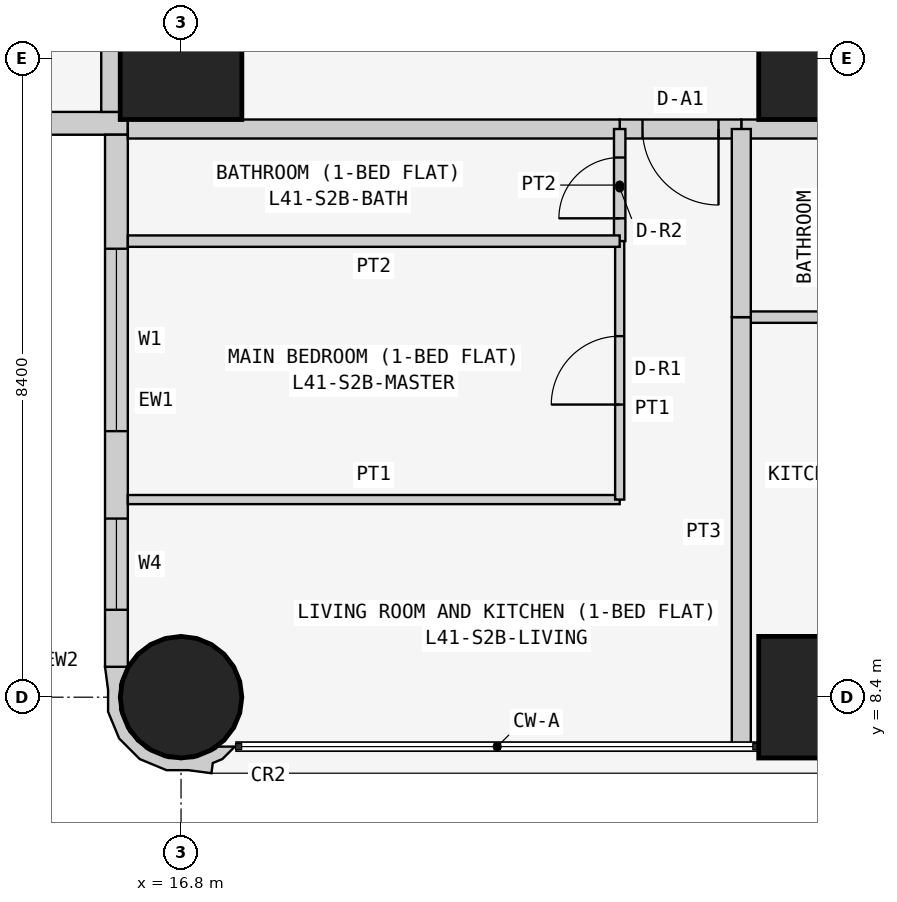
"""IFC4 building model, lengths in metres.
Left out: names, types, materials, properties, quantities, classifications, styles, units other than length and angle.
Written with IfcOpenShell. Run it as: python <this file> out.ifc"""

import sys

from ifc_helpers import new_model, si_unit, direction, frame, frame_2d, origin, origin_2d, place, context, subcontext, project, spatial, polyline, rectangle, circle, outline, extrude, element, fill, save


model = new_model("IFC4")
c1 = context("Model", 3, precision=1e-05, world=origin(), true_north=direction((0.0, 1.0)))
c2 = subcontext(c1, "Body", "Model", "MODEL_VIEW")
j1 = project(units=[si_unit("LENGTHUNIT", "METRE"), si_unit("PLANEANGLEUNIT", "RADIAN")], contexts=[c1])
p1 = place(None, origin())
s1 = spatial("IfcSite", under=j1, at=p1, CompositionType="ELEMENT")
p2 = place(p1, origin())
s2 = spatial("IfcBuilding", under=s1, at=p2, CompositionType="ELEMENT")
p3 = place(p2, frame((0.0, 0.0, 159.3)))
s3 = spatial("IfcBuildingStorey", under=s2, at=p3, CompositionType="ELEMENT", Elevation=159.3)
p4 = place(p3, frame((16.8, 8.4, 0.0), z_axis=(0.0, 0.0, 1.0), x_axis=(1.0, 0.0, 0.0)))
e1 = element("IfcColumn", 1, at=p4, inside=s3, PredefinedType="COLUMN", context=c2, shape_type="SweptSolid", body=[
    extrude(circle(Radius=0.8, at=origin_2d()), origin(), (0.0, 0.0, 1.0), 3.6),
])
for number, where, z_axis, x_axis in (
    (2, (16.8, 16.8, 0.0), (0.0, 0.0, 1.0), (1.0, 0.0, 0.0)),
    (3, (25.2, 8.4, 0.0), (0.0, 0.0, 1.0), (1.0, 0.0, 0.0)),
    (4, (25.2, 16.8, 0.0), (0.0, 0.0, 1.0), (1.0, 0.0, 0.0)),
):
    element("IfcColumn", number, at=place(p3, frame(where, z_axis=z_axis, x_axis=x_axis)), inside=s3, PredefinedType="COLUMN", context=c2, shape_type="SweptSolid", body=[
        extrude(rectangle(XDim=1.6, YDim=1.6, at=origin_2d()), origin(), (0.0, 0.0, 1.0), 3.6),
    ])
p5 = place(p3, frame((0.4, 15.95, 0.0), z_axis=(0.0, 0.0, 1.0), x_axis=(1.0, 0.0, 0.0)))
e5 = element("IfcWall", 5, at=p5, inside=s3, PredefinedType="SOLIDWALL", context=c2, shape_type="SweptSolid", body=[
    extrude(rectangle(XDim=15.7, YDim=0.3, at=frame_2d((7.85, 0.0))), origin(), (0.0, 0.0, 1.0), 3.45),
])
p6 = place(p5, frame((12.4, 0.0, 0.9)))
e6 = element("IfcOpeningElement", 6, at=p6, cuts=e5, PredefinedType="OPENING", context=c2, shape_type="SweptSolid", body=[
    extrude(rectangle(XDim=1.8, YDim=1.5, at=frame_2d((0.9, 0.75))), frame((0.0, 0.16, 0.0), z_axis=(0.0, -1.0, 0.0), x_axis=(1.0, 0.0, 0.0)), (0.0, 0.0, 1.0), 0.32),
])
p7 = place(p5, frame((9.55, 0.0, 1.5)))
e7 = element("IfcOpeningElement", 7, at=p7, cuts=e5, PredefinedType="OPENING", context=c2, shape_type="SweptSolid", body=[
    extrude(rectangle(XDim=0.9, YDim=0.7, at=frame_2d((0.45, 0.35))), frame((0.0, 0.16, 0.0), z_axis=(0.0, -1.0, 0.0), x_axis=(1.0, 0.0, 0.0)), (0.0, 0.0, 1.0), 0.32),
])
p8 = place(p5, frame((5.1, 0.0, 0.9)))
e8 = element("IfcOpeningElement", 8, at=p8, cuts=e5, PredefinedType="OPENING", context=c2, shape_type="SweptSolid", body=[
    extrude(rectangle(XDim=1.8, YDim=1.5, at=frame_2d((0.9, 0.75))), frame((0.0, 0.16, 0.0), z_axis=(0.0, -1.0, 0.0), x_axis=(1.0, 0.0, 0.0)), (0.0, 0.0, 1.0), 0.32),
])
p9 = place(p5, frame((2.0, 0.0, 0.0)))
e9 = element("IfcOpeningElement", 9, at=p9, cuts=e5, PredefinedType="OPENING", context=c2, shape_type="SweptSolid", body=[
    extrude(rectangle(XDim=0.9, YDim=2.4, at=frame_2d((0.45, 1.2))), frame((0.0, 0.16, 0.0), z_axis=(0.0, -1.0, 0.0), x_axis=(1.0, 0.0, 0.0)), (0.0, 0.0, 1.0), 0.32),
])
p10 = place(p5, frame((0.7, 0.0, 0.9)))
e10 = element("IfcOpeningElement", 10, at=p10, cuts=e5, PredefinedType="OPENING", context=c2, shape_type="SweptSolid", body=[
    extrude(rectangle(XDim=1.2, YDim=1.5, at=frame_2d((0.6, 0.75))), frame((0.0, 0.16, 0.0), z_axis=(0.0, -1.0, 0.0), x_axis=(1.0, 0.0, 0.0)), (0.0, 0.0, 1.0), 0.32),
])
p11 = place(p3, frame((15.95, 15.8, 0.0), z_axis=(0.0, 0.0, 1.0), x_axis=(0.0, -1.0, 0.0)))
e11 = element("IfcWall", 11, at=p11, inside=s3, PredefinedType="SOLIDWALL", context=c2, shape_type="SweptSolid", body=[
    extrude(rectangle(XDim=7.0, YDim=0.3, at=frame_2d((3.5, 0.0))), origin(), (0.0, 0.0, 1.0), 3.45),
])
p12 = place(p11, frame((1.5, 0.0, 0.9)))
e12 = element("IfcOpeningElement", 12, at=p12, cuts=e11, PredefinedType="OPENING", context=c2, shape_type="SweptSolid", body=[
    extrude(rectangle(XDim=2.4, YDim=1.5, at=frame_2d((1.2, 0.75))), frame((0.0, 0.16, 0.0), z_axis=(0.0, -1.0, 0.0), x_axis=(1.0, 0.0, 0.0)), (0.0, 0.0, 1.0), 0.32),
])
p13 = place(p11, frame((5.05, 0.0, 0.9)))
e13 = element("IfcOpeningElement", 13, at=p13, cuts=e11, PredefinedType="OPENING", context=c2, shape_type="SweptSolid", body=[
    extrude(rectangle(XDim=1.2, YDim=1.5, at=frame_2d((0.6, 0.75))), frame((0.0, 0.16, 0.0), z_axis=(0.0, -1.0, 0.0), x_axis=(1.0, 0.0, 0.0)), (0.0, 0.0, 1.0), 0.32),
])
p14 = place(p3, frame((15.983, 8.727, 0.0), z_axis=(0.0, 0.0, 1.0), x_axis=(-0.343276641956, -0.93923434088, 0.0)))
e14 = element("IfcWall", 14, at=p14, inside=s3, PredefinedType="SOLIDWALL", context=c2, shape_type="SweptSolid", body=[
    extrude(outline(polyline([(0.829, 1.599), (0.697, 1.569), (0.604, 1.67), (0.394, 1.767), (0.471, 1.556), (0.509, 1.539), (0.724, 1.304), (0.833, 1.005), (0.82, 0.686), (0.686, 0.397), (0.451, 0.182), (0.152, 0.073), (-0.116, 0.084), (-0.127, 0.078), (-0.146, 0.071), (-0.006, -0.197), (0.266, -0.055), (0.535, 0.044), (0.817, 0.302), (0.978, 0.648), (0.994, 1.03), (0.895, 1.3), (0.829, 1.599)])), origin(), (0.0, 0.0, 1.0), 3.45),
])
p15 = place(p3, frame((26.8, 15.875, 0.0), z_axis=(0.0, 0.0, 1.0), x_axis=(-1.0, 0.0, 0.0)))
e15 = element("IfcWall", 15, at=p15, inside=s3, PredefinedType="PARTITIONING", context=c2, shape_type="SweptSolid", body=[
    extrude(rectangle(XDim=2.629, YDim=0.25, at=frame_2d((1.314, 0.0))), origin(), (0.0, 0.0, 1.0), 3.45),
])
p16 = place(p3, frame((24.171, 15.875, 0.0), z_axis=(0.0, 0.0, 1.0), x_axis=(-1.0, 0.0, 0.0)))
e16 = element("IfcWall", 16, at=p16, inside=s3, PredefinedType="PARTITIONING", context=c2, shape_type="SweptSolid", body=[
    extrude(rectangle(XDim=1.6, YDim=0.25, at=frame_2d((0.8, 0.0))), origin(), (0.0, 0.0, 1.0), 3.45),
])
p17 = place(p16, frame((0.3, 0.0, 0.0)))
e17 = element("IfcOpeningElement", 17, at=p17, cuts=e16, PredefinedType="OPENING", context=c2, shape_type="SweptSolid", body=[
    extrude(rectangle(XDim=1.0, YDim=2.1, at=frame_2d((0.5, 1.05))), frame((0.0, 0.135, 0.0), z_axis=(0.0, -1.0, 0.0), x_axis=(1.0, 0.0, 0.0)), (0.0, 0.0, 1.0), 0.27),
])
p18 = place(p3, frame((22.571, 15.875, 0.0), z_axis=(0.0, 0.0, 1.0), x_axis=(-1.0, 0.0, 0.0)))
e18 = element("IfcWall", 18, at=p18, inside=s3, PredefinedType="PARTITIONING", context=c2, shape_type="SweptSolid", body=[
    extrude(rectangle(XDim=6.471, YDim=0.25, at=frame_2d((3.235, 0.0))), origin(), (0.0, 0.0, 1.0), 3.45),
])
p19 = place(p3, frame((15.875, 16.1, 0.0), z_axis=(0.0, 0.0, 1.0), x_axis=(0.0, 1.0, 0.0)))
e19 = element("IfcWall", 19, at=p19, inside=s3, PredefinedType="PARTITIONING", context=c2, shape_type="SweptSolid", body=[
    extrude(rectangle(XDim=6.871, YDim=0.25, at=frame_2d((3.436, 0.0))), origin(), (0.0, 0.0, 1.0), 3.45),
])
p20 = place(p3, frame((24.171, 13.4, 0.0), z_axis=(0.0, 0.0, 1.0), x_axis=(1.0, 0.0, 0.0)))
e20 = element("IfcWall", 20, at=p20, inside=s3, PredefinedType="PARTITIONING", context=c2, shape_type="SweptSolid", body=[
    extrude(rectangle(XDim=2.629, YDim=0.15, at=frame_2d((1.314, 0.0))), origin(), (0.0, 0.0, 1.0), 3.45),
])
p21 = place(p3, frame((24.171, 7.75, 0.0), z_axis=(0.0, 0.0, 1.0), x_axis=(0.0, 1.0, 0.0)))
e21 = element("IfcWall", 21, at=p21, inside=s3, PredefinedType="PARTITIONING", context=c2, shape_type="SweptSolid", body=[
    extrude(rectangle(XDim=5.65, YDim=0.25, at=frame_2d((2.825, 0.0))), origin(), (0.0, 0.0, 1.0), 3.45),
])
p22 = place(p3, frame((24.171, 13.4, 0.0), z_axis=(0.0, 0.0, 1.0), x_axis=(0.0, 1.0, 0.0)))
e22 = element("IfcWall", 22, at=p22, inside=s3, PredefinedType="PARTITIONING", context=c2, shape_type="SweptSolid", body=[
    extrude(rectangle(XDim=2.475, YDim=0.25, at=frame_2d((1.238, 0.0))), origin(), (0.0, 0.0, 1.0), 3.45),
])
p23 = place(p3, frame((22.571, 14.4, 0.0), z_axis=(0.0, 0.0, 1.0), x_axis=(0.0, 1.0, 0.0)))
e23 = element("IfcWall", 23, at=p23, inside=s3, PredefinedType="PARTITIONING", context=c2, shape_type="SweptSolid", body=[
    extrude(rectangle(XDim=1.475, YDim=0.15, at=frame_2d((0.738, 0.0))), origin(), (0.0, 0.0, 1.0), 3.45),
])
p24 = place(p23, frame((0.3, 0.0, 0.0)))
e24 = element("IfcOpeningElement", 24, at=p24, cuts=e23, PredefinedType="OPENING", context=c2, shape_type="SweptSolid", body=[
    extrude(rectangle(XDim=0.8, YDim=2.1, at=frame_2d((0.4, 1.05))), frame((0.0, 0.085, 0.0), z_axis=(0.0, -1.0, 0.0), x_axis=(1.0, 0.0, 0.0)), (0.0, 0.0, 1.0), 0.17),
])
p25 = place(p3, frame((16.1, 11.0, 0.0), z_axis=(0.0, 0.0, 1.0), x_axis=(1.0, 0.0, 0.0)))
e25 = element("IfcWall", 25, at=p25, inside=s3, PredefinedType="PARTITIONING", context=c2, shape_type="SweptSolid", body=[
    extrude(rectangle(XDim=6.471, YDim=0.12, at=frame_2d((3.235, 0.0))), origin(), (0.0, 0.0, 1.0), 3.45),
])
p26 = place(p3, frame((22.571, 11.0, 0.0), z_axis=(0.0, 0.0, 1.0), x_axis=(0.0, 1.0, 0.0)))
e26 = element("IfcWall", 26, at=p26, inside=s3, PredefinedType="PARTITIONING", context=c2, shape_type="SweptSolid", body=[
    extrude(rectangle(XDim=3.4, YDim=0.12, at=frame_2d((1.7, 0.0))), origin(), (0.0, 0.0, 1.0), 3.45),
])
p27 = place(p26, frame((1.25, 0.0, 0.0)))
e27 = element("IfcOpeningElement", 27, at=p27, cuts=e26, PredefinedType="OPENING", context=c2, shape_type="SweptSolid", body=[
    extrude(rectangle(XDim=0.9, YDim=2.1, at=frame_2d((0.45, 1.05))), frame((0.0, 0.07, 0.0), z_axis=(0.0, -1.0, 0.0), x_axis=(1.0, 0.0, 0.0)), (0.0, 0.0, 1.0), 0.14),
])
p28 = place(p3, frame((22.571, 14.4, 0.0), z_axis=(0.0, 0.0, 1.0), x_axis=(-1.0, 0.0, 0.0)))
e28 = element("IfcWall", 28, at=p28, inside=s3, PredefinedType="PARTITIONING", context=c2, shape_type="SweptSolid", body=[
    extrude(rectangle(XDim=6.471, YDim=0.15, at=frame_2d((3.235, 0.0))), origin(), (0.0, 0.0, 1.0), 3.45),
])
p29 = place(p12, origin())
e29 = element("IfcWindow", 29, at=p29, inside=s3, PartitioningType="SINGLE_PANEL", PredefinedType="WINDOW", context=c2, shape_type="SweptSolid", body=[
    extrude(rectangle(XDim=2.4, YDim=1.5, at=frame_2d((1.2, 0.75))), frame((0.0, 0.03, 0.0), z_axis=(0.0, -1.0, 0.0), x_axis=(1.0, 0.0, 0.0)), (0.0, 0.0, 1.0), 0.06),
])
fill(e12, e29)
p30 = place(p13, origin())
e30 = element("IfcWindow", 30, at=p30, inside=s3, PartitioningType="SINGLE_PANEL", PredefinedType="WINDOW", context=c2, shape_type="SweptSolid", body=[
    extrude(rectangle(XDim=1.2, YDim=1.5, at=frame_2d((0.6, 0.75))), frame((0.0, 0.03, 0.0), z_axis=(0.0, -1.0, 0.0), x_axis=(1.0, 0.0, 0.0)), (0.0, 0.0, 1.0), 0.06),
])
fill(e13, e30)
p31 = place(p17, origin())
e31 = element("IfcDoor", 31, at=p31, inside=s3, OperationType="SINGLE_SWING_LEFT", PredefinedType="DOOR", context=c2, shape_type="SweptSolid", body=[
    extrude(rectangle(XDim=1.0, YDim=2.1, at=frame_2d((0.5, 1.05))), frame((0.0, 0.025, 0.0), z_axis=(0.0, -1.0, 0.0), x_axis=(1.0, 0.0, 0.0)), (0.0, 0.0, 1.0), 0.05),
])
fill(e17, e31)
p32 = place(p24, origin())
e32 = element("IfcDoor", 32, at=p32, inside=s3, OperationType="SINGLE_SWING_LEFT", PredefinedType="DOOR", context=c2, shape_type="SweptSolid", body=[
    extrude(rectangle(XDim=0.8, YDim=2.1, at=frame_2d((0.4, 1.05))), frame((0.0, 0.025, 0.0), z_axis=(0.0, -1.0, 0.0), x_axis=(1.0, 0.0, 0.0)), (0.0, 0.0, 1.0), 0.05),
])
fill(e24, e32)
p33 = place(p27, origin())
e33 = element("IfcDoor", 33, at=p33, inside=s3, OperationType="SINGLE_SWING_LEFT", PredefinedType="DOOR", context=c2, shape_type="SweptSolid", body=[
    extrude(rectangle(XDim=0.9, YDim=2.1, at=frame_2d((0.45, 1.05))), frame((0.0, 0.025, 0.0), z_axis=(0.0, -1.0, 0.0), x_axis=(1.0, 0.0, 0.0)), (0.0, 0.0, 1.0), 0.05),
])
fill(e27, e33)
save(model, sys.argv[1])
